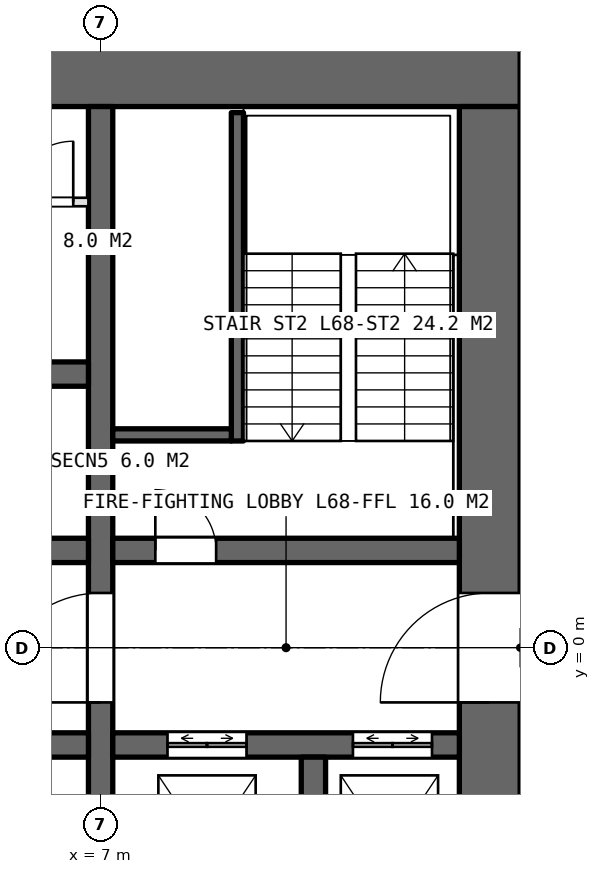
"""IFC4 building model, lengths in metres.
Left out: names, types, materials, properties, quantities, classifications, styles, units other than length and angle.
Written with IfcOpenShell. Run it as: python <this file> out.ifc"""

import sys

from ifc_helpers import new_model, si_unit, direction, frame, frame_2d, origin, place, context, subcontext, project, spatial, rectangle, extrude, element, fill, save


model = new_model("IFC4")
c1 = context("Model", 3, precision=1e-05, world=origin(), true_north=direction((0.0, 1.0)))
c2 = subcontext(c1, "Body", "Model", "MODEL_VIEW")
j1 = project(units=[si_unit("LENGTHUNIT", "METRE"), si_unit("PLANEANGLEUNIT", "RADIAN")], contexts=[c1])
p1 = place(None, origin())
s1 = spatial("IfcSite", under=j1, at=p1, CompositionType="ELEMENT")
p2 = place(p1, origin())
s2 = spatial("IfcBuilding", under=s1, at=p2, CompositionType="ELEMENT")
p3 = place(p2, frame((0.0, 0.0, 304.8)))
s3 = spatial("IfcBuildingStorey", under=s2, at=p3, CompositionType="ELEMENT", Elevation=304.8)
p4 = place(p3, frame((13.9, 9.4, 0.0), z_axis=(0.0, 0.0, 1.0), x_axis=(-1.0, 0.0, 0.0)))
e1 = element("IfcWall", 1, at=p4, inside=s3, PredefinedType="SHEAR", context=c2, shape_type="SweptSolid", body=[
    extrude(rectangle(XDim=27.8, YDim=1.0, at=frame_2d((13.9, 0.0))), origin(), (0.0, 0.0, 1.0), 4.2),
])
p5 = place(p4, frame((23.9, 0.0, 0.0)))
e2 = element("IfcOpeningElement", 2, at=p5, cuts=e1, PredefinedType="OPENING", context=c2, shape_type="SweptSolid", body=[
    extrude(rectangle(XDim=1.0, YDim=2.4, at=frame_2d((0.5, 1.2))), frame((0.0, 0.51, 0.0), z_axis=(0.0, -1.0, 0.0), x_axis=(1.0, 0.0, 0.0)), (0.0, 0.0, 1.0), 1.02),
])
p6 = place(p4, frame((13.0, 0.0, 0.0)))
e3 = element("IfcOpeningElement", 3, at=p6, cuts=e1, PredefinedType="OPENING", context=c2, shape_type="SweptSolid", body=[
    extrude(rectangle(XDim=1.8, YDim=2.4, at=frame_2d((0.9, 1.2))), frame((0.0, 0.51, 0.0), z_axis=(0.0, -1.0, 0.0), x_axis=(1.0, 0.0, 0.0)), (0.0, 0.0, 1.0), 1.02),
])
p7 = place(p3, frame((13.4, -8.9, 0.0), z_axis=(0.0, 0.0, 1.0), x_axis=(0.0, 1.0, 0.0)))
e4 = element("IfcWall", 4, at=p7, inside=s3, PredefinedType="SHEAR", context=c2, shape_type="SweptSolid", body=[
    extrude(rectangle(XDim=17.8, YDim=1.0, at=frame_2d((8.9, 0.0))), origin(), (0.0, 0.0, 1.0), 4.2),
])
p8 = place(p7, frame((8.0, 0.0, 0.0)))
e5 = element("IfcOpeningElement", 5, at=p8, cuts=e4, PredefinedType="OPENING", context=c2, shape_type="SweptSolid", body=[
    extrude(rectangle(XDim=1.8, YDim=2.4, at=frame_2d((0.9, 1.2))), frame((0.0, 0.51, 0.0), z_axis=(0.0, -1.0, 0.0), x_axis=(1.0, 0.0, 0.0)), (0.0, 0.0, 1.0), 1.02),
])
p9 = place(p3, frame((7.0, -8.9, 0.0), z_axis=(0.0, 0.0, 1.0), x_axis=(0.0, 1.0, 0.0)))
e6 = element("IfcWall", 6, at=p9, inside=s3, PredefinedType="SHEAR", context=c2, shape_type="SweptSolid", body=[
    extrude(rectangle(XDim=17.8, YDim=0.4, at=frame_2d((8.9, 0.0))), origin(), (0.0, 0.0, 1.0), 4.2),
])
p10 = place(p9, frame((8.0, 0.0, 0.0)))
e7 = element("IfcOpeningElement", 7, at=p10, cuts=e6, PredefinedType="OPENING", context=c2, shape_type="SweptSolid", body=[
    extrude(rectangle(XDim=1.8, YDim=2.4, at=frame_2d((0.9, 1.2))), frame((0.0, 0.21, 0.0), z_axis=(0.0, -1.0, 0.0), x_axis=(1.0, 0.0, 0.0)), (0.0, 0.0, 1.0), 0.42),
])
p11 = place(p3, frame((-6.8, 1.6, 0.0), z_axis=(0.0, 0.0, 1.0), x_axis=(1.0, 0.0, 0.0)))
e8 = element("IfcWall", 8, at=p11, inside=s3, PredefinedType="SHEAR", context=c2, shape_type="SweptSolid", body=[
    extrude(rectangle(XDim=13.6, YDim=0.4, at=frame_2d((6.8, 0.0))), origin(), (0.0, 0.0, 1.0), 4.2),
])
p12 = place(p11, frame((1.265, 0.0, 0.0)))
e9 = element("IfcOpeningElement", 9, at=p12, cuts=e8, PredefinedType="OPENING", context=c2, shape_type="SweptSolid", body=[
    extrude(rectangle(XDim=1.0, YDim=2.4, at=frame_2d((0.5, 1.2))), frame((0.0, 0.21, 0.0), z_axis=(0.0, -1.0, 0.0), x_axis=(1.0, 0.0, 0.0)), (0.0, 0.0, 1.0), 0.42),
])
p13 = place(p11, frame((4.0, 0.0, 0.0)))
e10 = element("IfcOpeningElement", 10, at=p13, cuts=e8, PredefinedType="OPENING", context=c2, shape_type="SweptSolid", body=[
    extrude(rectangle(XDim=1.0, YDim=2.4, at=frame_2d((0.5, 1.2))), frame((0.0, 0.21, 0.0), z_axis=(0.0, -1.0, 0.0), x_axis=(1.0, 0.0, 0.0)), (0.0, 0.0, 1.0), 0.42),
])
p14 = place(p11, frame((7.635, 0.0, 0.0)))
e11 = element("IfcOpeningElement", 11, at=p14, cuts=e8, PredefinedType="OPENING", context=c2, shape_type="SweptSolid", body=[
    extrude(rectangle(XDim=1.0, YDim=2.4, at=frame_2d((0.5, 1.2))), frame((0.0, 0.21, 0.0), z_axis=(0.0, -1.0, 0.0), x_axis=(1.0, 0.0, 0.0)), (0.0, 0.0, 1.0), 0.42),
])
p15 = place(p11, frame((11.9, 0.0, 0.0)))
e12 = element("IfcOpeningElement", 12, at=p15, cuts=e8, PredefinedType="OPENING", context=c2, shape_type="SweptSolid", body=[
    extrude(rectangle(XDim=1.0, YDim=2.4, at=frame_2d((0.5, 1.2))), frame((0.0, 0.21, 0.0), z_axis=(0.0, -1.0, 0.0), x_axis=(1.0, 0.0, 0.0)), (0.0, 0.0, 1.0), 0.42),
])
p16 = place(p3, frame((-6.8, -1.6, 0.0), z_axis=(0.0, 0.0, 1.0), x_axis=(1.0, 0.0, 0.0)))
e13 = element("IfcWall", 13, at=p16, inside=s3, PredefinedType="SHEAR", context=c2, shape_type="SweptSolid", body=[
    extrude(rectangle(XDim=13.6, YDim=0.4, at=frame_2d((6.8, 0.0))), origin(), (0.0, 0.0, 1.0), 4.2),
])
p17 = place(p16, frame((11.9, 0.0, 0.0)))
e14 = element("IfcOpeningElement", 14, at=p17, cuts=e13, PredefinedType="OPENING", context=c2, shape_type="SweptSolid", body=[
    extrude(rectangle(XDim=1.0, YDim=2.4, at=frame_2d((0.5, 1.2))), frame((0.0, 0.21, 0.0), z_axis=(0.0, -1.0, 0.0), x_axis=(1.0, 0.0, 0.0)), (0.0, 0.0, 1.0), 0.42),
])
p18 = place(p16, frame((4.5, 0.0, 0.0)))
e15 = element("IfcOpeningElement", 15, at=p18, cuts=e13, PredefinedType="OPENING", context=c2, shape_type="SweptSolid", body=[
    extrude(rectangle(XDim=1.8, YDim=2.4, at=frame_2d((0.9, 1.2))), frame((0.0, 0.21, 0.0), z_axis=(0.0, -1.0, 0.0), x_axis=(1.0, 0.0, 0.0)), (0.0, 0.0, 1.0), 0.42),
])
p19 = place(p3, frame((-6.8, 4.5, 0.0), z_axis=(0.0, 0.0, 1.0), x_axis=(1.0, 0.0, 0.0)))
e16 = element("IfcWall", 16, at=p19, inside=s3, PredefinedType="SHEAR", context=c2, shape_type="SweptSolid", body=[
    extrude(rectangle(XDim=13.6, YDim=0.4, at=frame_2d((6.8, 0.0))), origin(), (0.0, 0.0, 1.0), 4.2),
])
p20 = place(p3, frame((7.2, 1.6, 0.0), z_axis=(0.0, 0.0, 1.0), x_axis=(1.0, 0.0, 0.0)))
e17 = element("IfcWall", 17, at=p20, inside=s3, PredefinedType="SHEAR", context=c2, shape_type="SweptSolid", body=[
    extrude(rectangle(XDim=5.7, YDim=0.4, at=frame_2d((2.85, 0.0))), origin(), (0.0, 0.0, 1.0), 4.2),
])
p21 = place(p20, frame((0.7, 0.0, 0.0)))
e18 = element("IfcOpeningElement", 18, at=p21, cuts=e17, PredefinedType="OPENING", context=c2, shape_type="SweptSolid", body=[
    extrude(rectangle(XDim=1.0, YDim=2.4, at=frame_2d((0.5, 1.2))), frame((0.0, 0.21, 0.0), z_axis=(0.0, -1.0, 0.0), x_axis=(1.0, 0.0, 0.0)), (0.0, 0.0, 1.0), 0.42),
])
p22 = place(p3, frame((7.2, -1.6, 0.0), z_axis=(0.0, 0.0, 1.0), x_axis=(1.0, 0.0, 0.0)))
e19 = element("IfcWall", 19, at=p22, inside=s3, PredefinedType="SHEAR", context=c2, shape_type="SweptSolid", body=[
    extrude(rectangle(XDim=5.7, YDim=0.4, at=frame_2d((2.85, 0.0))), origin(), (0.0, 0.0, 1.0), 4.2),
])
p23 = place(p22, frame((0.9, 0.0, 0.0)))
e20 = element("IfcOpeningElement", 20, at=p23, cuts=e19, PredefinedType="OPENING", context=c2, shape_type="SweptSolid", body=[
    extrude(rectangle(XDim=1.3, YDim=2.4, at=frame_2d((0.65, 1.2))), frame((0.0, 0.21, 0.0), z_axis=(0.0, -1.0, 0.0), x_axis=(1.0, 0.0, 0.0)), (0.0, 0.0, 1.0), 0.42),
])
p24 = place(p22, frame((3.95, 0.0, 0.0)))
e21 = element("IfcOpeningElement", 21, at=p24, cuts=e19, PredefinedType="OPENING", context=c2, shape_type="SweptSolid", body=[
    extrude(rectangle(XDim=1.3, YDim=2.4, at=frame_2d((0.65, 1.2))), frame((0.0, 0.21, 0.0), z_axis=(0.0, -1.0, 0.0), x_axis=(1.0, 0.0, 0.0)), (0.0, 0.0, 1.0), 0.42),
])
p25 = place(p3, frame((10.5, -4.8, 0.0), z_axis=(0.0, 0.0, 1.0), x_axis=(0.0, 1.0, 0.0)))
e22 = element("IfcWall", 22, at=p25, inside=s3, PredefinedType="SHEAR", context=c2, shape_type="SweptSolid", body=[
    extrude(rectangle(XDim=3.0, YDim=0.4, at=frame_2d((1.5, 0.0))), origin(), (0.0, 0.0, 1.0), 4.2),
])
p26 = place(p3, frame((-6.8, 7.33, 0.0), z_axis=(0.0, 0.0, 1.0), x_axis=(1.0, 0.0, 0.0)))
e23 = element("IfcWall", 23, at=p26, inside=s3, PredefinedType="PARTITIONING", context=c2, shape_type="SweptSolid", body=[
    extrude(rectangle(XDim=13.6, YDim=0.14, at=frame_2d((6.8, 0.0))), origin(), (0.0, 0.0, 1.0), 3.95),
])
p27 = place(p26, frame((0.58, 0.0, 0.0)))
e24 = element("IfcOpeningElement", 24, at=p27, cuts=e23, PredefinedType="OPENING", context=c2, shape_type="SweptSolid", body=[
    extrude(rectangle(XDim=0.9, YDim=2.4, at=frame_2d((0.45, 1.2))), frame((0.0, 0.08, 0.0), z_axis=(0.0, -1.0, 0.0), x_axis=(1.0, 0.0, 0.0)), (0.0, 0.0, 1.0), 0.16),
])
p28 = place(p26, frame((4.38, 0.0, 0.0)))
e25 = element("IfcOpeningElement", 25, at=p28, cuts=e23, PredefinedType="OPENING", context=c2, shape_type="SweptSolid", body=[
    extrude(rectangle(XDim=1.1, YDim=2.4, at=frame_2d((0.55, 1.2))), frame((0.0, 0.08, 0.0), z_axis=(0.0, -1.0, 0.0), x_axis=(1.0, 0.0, 0.0)), (0.0, 0.0, 1.0), 0.16),
])
p29 = place(p26, frame((9.08, 0.0, 0.0)))
e26 = element("IfcOpeningElement", 26, at=p29, cuts=e23, PredefinedType="OPENING", context=c2, shape_type="SweptSolid", body=[
    extrude(rectangle(XDim=1.0, YDim=2.4, at=frame_2d((0.5, 1.2))), frame((0.0, 0.08, 0.0), z_axis=(0.0, -1.0, 0.0), x_axis=(1.0, 0.0, 0.0)), (0.0, 0.0, 1.0), 0.16),
])
p30 = place(p26, frame((12.35, 0.0, 0.0)))
e27 = element("IfcOpeningElement", 27, at=p30, cuts=e23, PredefinedType="OPENING", context=c2, shape_type="SweptSolid", body=[
    extrude(rectangle(XDim=1.0, YDim=2.4, at=frame_2d((0.5, 1.2))), frame((0.0, 0.08, 0.0), z_axis=(0.0, -1.0, 0.0), x_axis=(1.0, 0.0, 0.0)), (0.0, 0.0, 1.0), 0.16),
])
p31 = place(p3, frame((9.25, 3.4, 0.0), z_axis=(0.0, 0.0, 1.0), x_axis=(0.0, 1.0, 0.0)))
e28 = element("IfcWall", 28, at=p31, inside=s3, PredefinedType="SOLIDWALL", context=c2, shape_type="SweptSolid", body=[
    extrude(rectangle(XDim=5.4, YDim=0.2, at=frame_2d((2.7, 0.0))), origin(), (0.0, 0.0, 1.0), 4.2),
])
p32 = place(p3, frame((9.15, 3.5, 0.0), z_axis=(0.0, 0.0, 1.0), x_axis=(-1.0, 0.0, 0.0)))
e29 = element("IfcWall", 29, at=p32, inside=s3, PredefinedType="SOLIDWALL", context=c2, shape_type="SweptSolid", body=[
    extrude(rectangle(XDim=1.95, YDim=0.2, at=frame_2d((0.975, 0.0))), origin(), (0.0, 0.0, 1.0), 4.2),
])
p33 = place(p8, origin())
e30 = element("IfcDoor", 30, at=p33, inside=s3, OperationType="DOUBLE_DOOR_SINGLE_SWING", PredefinedType="DOOR", context=c2, shape_type="SweptSolid", body=[
    extrude(rectangle(XDim=1.8, YDim=2.4, at=frame_2d((0.9, 1.2))), frame((0.0, 0.025, 0.0), z_axis=(0.0, -1.0, 0.0), x_axis=(1.0, 0.0, 0.0)), (0.0, 0.0, 1.0), 0.05),
])
fill(e5, e30)
p34 = place(p10, origin())
e31 = element("IfcDoor", 31, at=p34, inside=s3, OperationType="DOUBLE_DOOR_SINGLE_SWING", PredefinedType="DOOR", context=c2, shape_type="SweptSolid", body=[
    extrude(rectangle(XDim=1.8, YDim=2.4, at=frame_2d((0.9, 1.2))), frame((0.0, 0.025, 0.0), z_axis=(0.0, -1.0, 0.0), x_axis=(1.0, 0.0, 0.0)), (0.0, 0.0, 1.0), 0.05),
])
fill(e7, e31)
p35 = place(p21, origin())
e32 = element("IfcDoor", 32, at=p35, inside=s3, OperationType="SINGLE_SWING_LEFT", PredefinedType="DOOR", context=c2, shape_type="SweptSolid", body=[
    extrude(rectangle(XDim=1.0, YDim=2.4, at=frame_2d((0.5, 1.2))), frame((0.0, 0.025, 0.0), z_axis=(0.0, -1.0, 0.0), x_axis=(1.0, 0.0, 0.0)), (0.0, 0.0, 1.0), 0.05),
])
fill(e18, e32)
p36 = place(p30, origin())
e33 = element("IfcDoor", 33, at=p36, inside=s3, OperationType="SINGLE_SWING_RIGHT", PredefinedType="DOOR", context=c2, shape_type="SweptSolid", body=[
    extrude(rectangle(XDim=1.0, YDim=2.4, at=frame_2d((0.5, 1.2))), frame((0.0, 0.025, 0.0), z_axis=(0.0, -1.0, 0.0), x_axis=(1.0, 0.0, 0.0)), (0.0, 0.0, 1.0), 0.05),
])
fill(e27, e33)
p37 = place(p23, origin())
e34 = element("IfcDoor", 34, at=p37, inside=s3, OperationType="DOUBLE_DOOR_SLIDING", PredefinedType="DOOR", context=c2, shape_type="SweptSolid", body=[
    extrude(rectangle(XDim=1.3, YDim=2.4, at=frame_2d((0.65, 1.2))), frame((0.0, 0.025, 0.0), z_axis=(0.0, -1.0, 0.0), x_axis=(1.0, 0.0, 0.0)), (0.0, 0.0, 1.0), 0.05),
])
fill(e20, e34)
p38 = place(p24, origin())
e35 = element("IfcDoor", 35, at=p38, inside=s3, OperationType="DOUBLE_DOOR_SLIDING", PredefinedType="DOOR", context=c2, shape_type="SweptSolid", body=[
    extrude(rectangle(XDim=1.3, YDim=2.4, at=frame_2d((0.65, 1.2))), frame((0.0, 0.025, 0.0), z_axis=(0.0, -1.0, 0.0), x_axis=(1.0, 0.0, 0.0)), (0.0, 0.0, 1.0), 0.05),
])
fill(e21, e35)
save(model, sys.argv[1])
